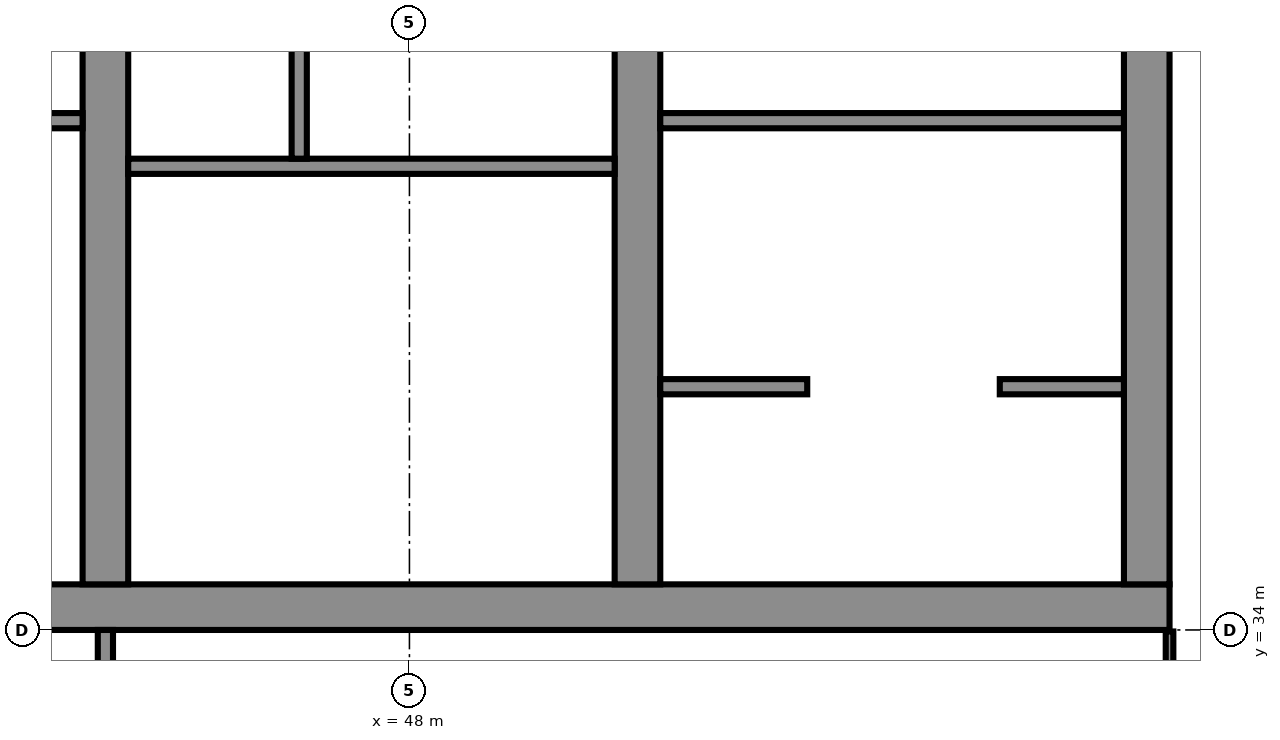
"""IFC4 building model, lengths in metres.
Left out: names, types, materials, properties, quantities, classifications, styles, units other than length and angle.
Written with IfcOpenShell. Run it as: python <this file> out.ifc"""

import sys

from ifc_helpers import new_model, si_unit, direction, frame, frame_2d, origin, place, context, subcontext, project, spatial, polyline, rectangle, outline, extrude, element, fill, save


model = new_model("IFC4")
c1 = context("Model", 3, precision=1e-05, world=origin(), true_north=direction((0.0, 1.0)))
c2 = subcontext(c1, "Body", "Model", "MODEL_VIEW")
j1 = project(units=[si_unit("LENGTHUNIT", "METRE"), si_unit("PLANEANGLEUNIT", "RADIAN")], contexts=[c1])
p1 = place(None, origin())
s1 = spatial("IfcSite", under=j1, at=p1, CompositionType="ELEMENT")
p2 = place(p1, origin())
s2 = spatial("IfcBuilding", under=s1, at=p2, CompositionType="ELEMENT")
p3 = place(p2, frame((0.0, 0.0, 207.1)))
s3 = spatial("IfcBuildingStorey", under=s2, at=p3, CompositionType="ELEMENT", Elevation=207.1)
p4 = place(p3, frame((23.0, 34.3, 0.0), z_axis=(0.0, 0.0, 1.0), x_axis=(1.0, 0.0, 0.0)))
e1 = element("IfcWall", 1, at=p4, inside=s3, PredefinedType="SHEAR", context=c2, shape_type="SweptSolid", body=[
    extrude(rectangle(XDim=35.0, YDim=0.6, at=frame_2d((17.5, 0.0))), origin(), (0.0, 0.0, 1.0), 3.6),
])
p5 = place(p4, frame((0.65, 0.0, 0.0)))
e2 = element("IfcOpeningElement", 2, at=p5, cuts=e1, PredefinedType="OPENING", context=c2, shape_type="SweptSolid", body=[
    extrude(rectangle(XDim=1.2, YDim=2.1, at=frame_2d((0.6, 1.05))), frame((0.0, 0.31, 0.0), z_axis=(0.0, -1.0, 0.0), x_axis=(1.0, 0.0, 0.0)), (0.0, 0.0, 1.0), 0.62),
])
p6 = place(p4, frame((7.717, 0.0, 0.0)))
e3 = element("IfcOpeningElement", 3, at=p6, cuts=e1, PredefinedType="OPENING", context=c2, shape_type="SweptSolid", body=[
    extrude(rectangle(XDim=1.1, YDim=2.1, at=frame_2d((0.55, 1.05))), frame((0.0, 0.31, 0.0), z_axis=(0.0, -1.0, 0.0), x_axis=(1.0, 0.0, 0.0)), (0.0, 0.0, 1.0), 0.62),
])
p7 = place(p4, frame((12.183, 0.0, 0.0)))
e4 = element("IfcOpeningElement", 4, at=p7, cuts=e1, PredefinedType="OPENING", context=c2, shape_type="SweptSolid", body=[
    extrude(rectangle(XDim=1.1, YDim=2.1, at=frame_2d((0.55, 1.05))), frame((0.0, 0.31, 0.0), z_axis=(0.0, -1.0, 0.0), x_axis=(1.0, 0.0, 0.0)), (0.0, 0.0, 1.0), 0.62),
])
p8 = place(p4, frame((9.8, 0.0, 0.0)))
e5 = element("IfcOpeningElement", 5, at=p8, cuts=e1, PredefinedType="OPENING", context=c2, shape_type="SweptSolid", body=[
    extrude(rectangle(XDim=1.4, YDim=2.1, at=frame_2d((0.7, 1.05))), frame((0.0, 0.31, 0.0), z_axis=(0.0, -1.0, 0.0), x_axis=(1.0, 0.0, 0.0)), (0.0, 0.0, 1.0), 0.62),
])
p9 = place(p4, frame((14.717, 0.0, 0.0)))
e6 = element("IfcOpeningElement", 6, at=p9, cuts=e1, PredefinedType="OPENING", context=c2, shape_type="SweptSolid", body=[
    extrude(rectangle(XDim=1.1, YDim=2.1, at=frame_2d((0.55, 1.05))), frame((0.0, 0.31, 0.0), z_axis=(0.0, -1.0, 0.0), x_axis=(1.0, 0.0, 0.0)), (0.0, 0.0, 1.0), 0.62),
])
p10 = place(p4, frame((16.95, 0.0, 0.0)))
e7 = element("IfcOpeningElement", 7, at=p10, cuts=e1, PredefinedType="OPENING", context=c2, shape_type="SweptSolid", body=[
    extrude(rectangle(XDim=1.1, YDim=2.1, at=frame_2d((0.55, 1.05))), frame((0.0, 0.31, 0.0), z_axis=(0.0, -1.0, 0.0), x_axis=(1.0, 0.0, 0.0)), (0.0, 0.0, 1.0), 0.62),
])
p11 = place(p4, frame((19.183, 0.0, 0.0)))
e8 = element("IfcOpeningElement", 8, at=p11, cuts=e1, PredefinedType="OPENING", context=c2, shape_type="SweptSolid", body=[
    extrude(rectangle(XDim=1.1, YDim=2.1, at=frame_2d((0.55, 1.05))), frame((0.0, 0.31, 0.0), z_axis=(0.0, -1.0, 0.0), x_axis=(1.0, 0.0, 0.0)), (0.0, 0.0, 1.0), 0.62),
])
p12 = place(p4, frame((26.15, 0.0, 0.0)))
e9 = element("IfcOpeningElement", 9, at=p12, cuts=e1, PredefinedType="OPENING", context=c2, shape_type="SweptSolid", body=[
    extrude(rectangle(XDim=1.2, YDim=2.1, at=frame_2d((0.6, 1.05))), frame((0.0, 0.31, 0.0), z_axis=(0.0, -1.0, 0.0), x_axis=(1.0, 0.0, 0.0)), (0.0, 0.0, 1.0), 0.62),
])
p13 = place(p4, frame((28.767, 0.0, 0.0)))
e10 = element("IfcOpeningElement", 10, at=p13, cuts=e1, PredefinedType="OPENING", context=c2, shape_type="SweptSolid", body=[
    extrude(rectangle(XDim=1.0, YDim=2.1, at=frame_2d((0.5, 1.05))), frame((0.0, 0.31, 0.0), z_axis=(0.0, -1.0, 0.0), x_axis=(1.0, 0.0, 0.0)), (0.0, 0.0, 1.0), 0.62),
])
p14 = place(p4, frame((33.083, 0.0, 0.0)))
e11 = element("IfcOpeningElement", 11, at=p14, cuts=e1, PredefinedType="OPENING", context=c2, shape_type="SweptSolid", body=[
    extrude(rectangle(XDim=1.0, YDim=2.1, at=frame_2d((0.5, 1.05))), frame((0.0, 0.31, 0.0), z_axis=(0.0, -1.0, 0.0), x_axis=(1.0, 0.0, 0.0)), (0.0, 0.0, 1.0), 0.62),
])
p15 = place(p4, frame((30.8, 0.0, 0.0)))
e12 = element("IfcOpeningElement", 12, at=p15, cuts=e1, PredefinedType="OPENING", context=c2, shape_type="SweptSolid", body=[
    extrude(rectangle(XDim=1.4, YDim=2.1, at=frame_2d((0.7, 1.05))), frame((0.0, 0.31, 0.0), z_axis=(0.0, -1.0, 0.0), x_axis=(1.0, 0.0, 0.0)), (0.0, 0.0, 1.0), 0.62),
])
p16 = place(p3, frame((44.0, 34.6, 0.0), z_axis=(0.0, 0.0, 1.0), x_axis=(0.0, 1.0, 0.0)))
e13 = element("IfcWall", 13, at=p16, inside=s3, PredefinedType="SHEAR", context=c2, shape_type="SweptSolid", body=[
    extrude(rectangle(XDim=14.784, YDim=0.6, at=frame_2d((7.392, 0.0))), origin(), (0.0, 0.0, 1.0), 3.6),
])
p17 = place(p16, frame((11.608, 0.0, 0.0)))
e14 = element("IfcOpeningElement", 14, at=p17, cuts=e13, PredefinedType="OPENING", context=c2, shape_type="SweptSolid", body=[
    extrude(rectangle(XDim=1.0, YDim=2.1, at=frame_2d((0.5, 1.05))), frame((0.0, 0.31, 0.0), z_axis=(0.0, -1.0, 0.0), x_axis=(1.0, 0.0, 0.0)), (0.0, 0.0, 1.0), 0.62),
])
p18 = place(p16, frame((3.8, 0.0, 0.0)))
e15 = element("IfcOpeningElement", 15, at=p18, cuts=e13, PredefinedType="OPENING", context=c2, shape_type="SweptSolid", body=[
    extrude(rectangle(XDim=1.1, YDim=2.1, at=frame_2d((0.55, 1.05))), frame((0.0, 0.31, 0.0), z_axis=(0.0, -1.0, 0.0), x_axis=(1.0, 0.0, 0.0)), (0.0, 0.0, 1.0), 0.62),
])
p19 = place(p3, frame((51.0, 34.6, 0.0), z_axis=(0.0, 0.0, 1.0), x_axis=(0.0, 1.0, 0.0)))
e16 = element("IfcWall", 16, at=p19, inside=s3, PredefinedType="SHEAR", context=c2, shape_type="SweptSolid", body=[
    extrude(rectangle(XDim=14.171, YDim=0.6, at=frame_2d((7.085, 0.0))), origin(), (0.0, 0.0, 1.0), 3.6),
])
p20 = place(p19, frame((3.8, 0.0, 0.0)))
e17 = element("IfcOpeningElement", 17, at=p20, cuts=e16, PredefinedType="OPENING", context=c2, shape_type="SweptSolid", body=[
    extrude(rectangle(XDim=1.1, YDim=2.1, at=frame_2d((0.55, 1.05))), frame((0.0, 0.31, 0.0), z_axis=(0.0, -1.0, 0.0), x_axis=(1.0, 0.0, 0.0)), (0.0, 0.0, 1.0), 0.62),
])
p21 = place(p3, frame((57.7, 34.6, 0.0), z_axis=(0.0, 0.0, 1.0), x_axis=(0.0, 1.0, 0.0)))
e18 = element("IfcWall", 18, at=p21, inside=s3, PredefinedType="SHEAR", context=c2, shape_type="SweptSolid", body=[
    extrude(rectangle(XDim=13.585, YDim=0.6, at=frame_2d((6.792, 0.0))), origin(), (0.0, 0.0, 1.0), 3.6),
])
p22 = place(p3, frame((37.3, 40.7, 0.0), z_axis=(0.0, 0.0, 1.0), x_axis=(1.0, 0.0, 0.0)))
e19 = element("IfcWall", 19, at=p22, inside=s3, PredefinedType="PARTITIONING", context=c2, shape_type="SweptSolid", body=[
    extrude(rectangle(XDim=6.4, YDim=0.2, at=frame_2d((3.2, 0.0))), origin(), (0.0, 0.0, 1.0), 3.2),
])
p23 = place(p22, frame((0.417, 0.0, 0.0)))
e20 = element("IfcOpeningElement", 20, at=p23, cuts=e19, PredefinedType="OPENING", context=c2, shape_type="SweptSolid", body=[
    extrude(rectangle(XDim=1.1, YDim=2.1, at=frame_2d((0.55, 1.05))), frame((0.0, 0.11, 0.0), z_axis=(0.0, -1.0, 0.0), x_axis=(1.0, 0.0, 0.0)), (0.0, 0.0, 1.0), 0.22),
])
p24 = place(p22, frame((2.65, 0.0, 0.0)))
e21 = element("IfcOpeningElement", 21, at=p24, cuts=e19, PredefinedType="OPENING", context=c2, shape_type="SweptSolid", body=[
    extrude(rectangle(XDim=1.1, YDim=2.1, at=frame_2d((0.55, 1.05))), frame((0.0, 0.11, 0.0), z_axis=(0.0, -1.0, 0.0), x_axis=(1.0, 0.0, 0.0)), (0.0, 0.0, 1.0), 0.22),
])
p25 = place(p22, frame((4.883, 0.0, 0.0)))
e22 = element("IfcOpeningElement", 22, at=p25, cuts=e19, PredefinedType="OPENING", context=c2, shape_type="SweptSolid", body=[
    extrude(rectangle(XDim=1.1, YDim=2.1, at=frame_2d((0.55, 1.05))), frame((0.0, 0.11, 0.0), z_axis=(0.0, -1.0, 0.0), x_axis=(1.0, 0.0, 0.0)), (0.0, 0.0, 1.0), 0.22),
])
p26 = place(p3, frame((0.0, 0.0, -0.0)))
e23 = element("IfcWall", 23, at=p26, inside=s3, PredefinedType="PARTITIONING", context=c2, shape_type="SweptSolid", body=[
    extrude(outline(polyline([(41.567, 37.1), (39.433, 37.1), (39.433, 34.6), (39.233, 34.6), (39.233, 37.45), (37.3, 37.45), (37.3, 37.65), (39.233, 37.65), (39.433, 37.65), (39.433, 37.3), (41.567, 37.3), (41.567, 37.35), (41.767, 37.35), (43.7, 37.35), (43.7, 37.15), (41.767, 37.15), (41.767, 34.6), (41.567, 34.6), (41.567, 37.1)])), origin(), (0.0, 0.0, 1.0), 3.2),
])
p27 = place(p3, frame((0.0, 0.0, -0.0)))
e24 = element("IfcWall", 24, at=p27, inside=s3, PredefinedType="PARTITIONING", context=c2, shape_type="SweptSolid", body=[
    extrude(outline(polyline([(39.433, 40.8), (39.233, 40.8), (39.233, 43.8), (37.3, 43.8), (37.3, 44.0), (43.7, 44.0), (43.7, 43.8), (41.767, 43.8), (41.767, 40.8), (41.567, 40.8), (41.567, 43.8), (39.433, 43.8), (39.433, 40.8)])), origin(), (0.0, 0.0, 1.0), 3.2),
])
p28 = place(p3, frame((44.3, 40.1, 0.0), z_axis=(0.0, 0.0, 1.0), x_axis=(1.0, 0.0, 0.0)))
e25 = element("IfcWall", 25, at=p28, inside=s3, PredefinedType="SHEAR", context=c2, shape_type="SweptSolid", body=[
    extrude(rectangle(XDim=6.4, YDim=0.2, at=frame_2d((3.2, 0.0))), origin(), (0.0, 0.0, 1.0), 3.2),
])
p29 = place(p28, frame((3.625, 0.0, 0.0)))
e26 = element("IfcOpeningElement", 26, at=p29, cuts=e25, PredefinedType="OPENING", context=c2, shape_type="SweptSolid", body=[
    extrude(rectangle(XDim=1.2, YDim=2.1, at=frame_2d((0.6, 1.05))), frame((0.0, 0.11, 0.0), z_axis=(0.0, -1.0, 0.0), x_axis=(1.0, 0.0, 0.0)), (0.0, 0.0, 1.0), 0.22),
])
p30 = place(p28, frame((0.625, 0.0, 0.0)))
e27 = element("IfcOpeningElement", 27, at=p30, cuts=e25, PredefinedType="OPENING", context=c2, shape_type="SweptSolid", body=[
    extrude(rectangle(XDim=0.9, YDim=2.1, at=frame_2d((0.45, 1.05))), frame((0.0, 0.11, 0.0), z_axis=(0.0, -1.0, 0.0), x_axis=(1.0, 0.0, 0.0)), (0.0, 0.0, 1.0), 0.22),
])
p31 = place(p3, frame((46.55, 40.2, 0.0), z_axis=(0.0, 0.0, 1.0), x_axis=(0.0, 1.0, 0.0)))
e28 = element("IfcWall", 28, at=p31, inside=s3, PredefinedType="SHEAR", context=c2, shape_type="SweptSolid", body=[
    extrude(rectangle(XDim=7.2, YDim=0.2, at=frame_2d((3.6, 0.0))), origin(), (0.0, 0.0, 1.0), 3.2),
])
p32 = place(p3, frame((51.3, 37.2, 0.0), z_axis=(0.0, 0.0, 1.0), x_axis=(1.0, 0.0, 0.0)))
e29 = element("IfcWall", 29, at=p32, inside=s3, PredefinedType="PARTITIONING", context=c2, shape_type="SweptSolid", body=[
    extrude(rectangle(XDim=1.933, YDim=0.2, at=frame_2d((0.967, 0.0))), origin(), (0.0, 0.0, 1.0), 3.2),
])
p33 = place(p32, frame((0.467, 0.0, 0.0)))
e30 = element("IfcOpeningElement", 30, at=p33, cuts=e29, PredefinedType="OPENING", context=c2, shape_type="SweptSolid", body=[
    extrude(rectangle(XDim=1.0, YDim=2.1, at=frame_2d((0.5, 1.05))), frame((0.0, 0.11, 0.0), z_axis=(0.0, -1.0, 0.0), x_axis=(1.0, 0.0, 0.0)), (0.0, 0.0, 1.0), 0.22),
])
p34 = place(p3, frame((55.767, 37.2, 0.0), z_axis=(0.0, 0.0, 1.0), x_axis=(1.0, 0.0, 0.0)))
e31 = element("IfcWall", 31, at=p34, inside=s3, PredefinedType="PARTITIONING", context=c2, shape_type="SweptSolid", body=[
    extrude(rectangle(XDim=1.633, YDim=0.2, at=frame_2d((0.817, 0.0))), origin(), (0.0, 0.0, 1.0), 3.2),
])
p35 = place(p34, frame((0.317, 0.0, 0.0)))
e32 = element("IfcOpeningElement", 32, at=p35, cuts=e31, PredefinedType="OPENING", context=c2, shape_type="SweptSolid", body=[
    extrude(rectangle(XDim=1.0, YDim=2.1, at=frame_2d((0.5, 1.05))), frame((0.0, 0.11, 0.0), z_axis=(0.0, -1.0, 0.0), x_axis=(1.0, 0.0, 0.0)), (0.0, 0.0, 1.0), 0.22),
])
p36 = place(p3, frame((51.3, 40.7, 0.0), z_axis=(0.0, 0.0, 1.0), x_axis=(1.0, 0.0, 0.0)))
e33 = element("IfcWall", 33, at=p36, inside=s3, PredefinedType="PARTITIONING", context=c2, shape_type="SweptSolid", body=[
    extrude(rectangle(XDim=6.1, YDim=0.2, at=frame_2d((3.05, 0.0))), origin(), (0.0, 0.0, 1.0), 3.2),
])
p37 = place(p36, frame((0.417, 0.0, 0.0)))
e34 = element("IfcOpeningElement", 34, at=p37, cuts=e33, PredefinedType="OPENING", context=c2, shape_type="SweptSolid", body=[
    extrude(rectangle(XDim=1.1, YDim=2.1, at=frame_2d((0.55, 1.05))), frame((0.0, 0.11, 0.0), z_axis=(0.0, -1.0, 0.0), x_axis=(1.0, 0.0, 0.0)), (0.0, 0.0, 1.0), 0.22),
])
p38 = place(p36, frame((3.617, 0.0, 0.0)))
e35 = element("IfcOpeningElement", 35, at=p38, cuts=e33, PredefinedType="OPENING", context=c2, shape_type="SweptSolid", body=[
    extrude(rectangle(XDim=1.0, YDim=2.1, at=frame_2d((0.5, 1.05))), frame((0.0, 0.11, 0.0), z_axis=(0.0, -1.0, 0.0), x_axis=(1.0, 0.0, 0.0)), (0.0, 0.0, 1.0), 0.22),
])
p39 = place(p3, frame((0.0, 0.0, -0.0)))
e36 = element("IfcWall", 36, at=p39, inside=s3, PredefinedType="PARTITIONING", context=c2, shape_type="SweptSolid", body=[
    extrude(outline(polyline([(53.233, 34.6), (53.233, 37.3), (53.433, 37.3), (53.433, 34.6), (53.233, 34.6)])), origin(), (0.0, 0.0, 1.0), 3.2),
])
p40 = place(p3, frame((0.0, 0.0, -0.0)))
e37 = element("IfcWall", 37, at=p40, inside=s3, PredefinedType="PARTITIONING", context=c2, shape_type="SweptSolid", body=[
    extrude(outline(polyline([(55.567, 34.6), (55.567, 37.3), (55.767, 37.3), (55.767, 34.6), (55.567, 34.6)])), origin(), (0.0, 0.0, 1.0), 3.2),
])
p41 = place(p3, frame((0.0, 0.0, -0.0)))
e38 = element("IfcWall", 38, at=p41, inside=s3, PredefinedType="PARTITIONING", context=c2, shape_type="SweptSolid", body=[
    extrude(outline(polyline([(53.433, 40.8), (53.433, 43.8), (53.233, 43.8), (53.233, 40.8), (53.433, 40.8)])), origin(), (0.0, 0.0, 1.0), 3.2),
])
p42 = place(p3, frame((44.0, 30.5, 0.0), z_axis=(0.0, 0.0, 1.0), x_axis=(0.0, 1.0, 0.0)))
e39 = element("IfcWall", 39, at=p42, inside=s3, PredefinedType="PARTITIONING", context=c2, shape_type="SweptSolid", body=[
    extrude(rectangle(XDim=3.5, YDim=0.2, at=frame_2d((1.75, 0.0))), origin(), (0.0, 0.0, 1.0), 3.2),
])
p43 = place(p42, frame((1.2, 0.0, 0.0)))
e40 = element("IfcOpeningElement", 40, at=p43, cuts=e39, PredefinedType="OPENING", context=c2, shape_type="SweptSolid", body=[
    extrude(rectangle(XDim=1.1, YDim=2.1, at=frame_2d((0.55, 1.05))), frame((0.0, 0.11, 0.0), z_axis=(0.0, -1.0, 0.0), x_axis=(1.0, 0.0, 0.0)), (0.0, 0.0, 1.0), 0.22),
])
p44 = place(p3, frame((58.0, 30.5, 0.0), z_axis=(0.0, 0.0, 1.0), x_axis=(0.0, 1.0, 0.0)))
e41 = element("IfcWall", 41, at=p44, inside=s3, PredefinedType="PARTITIONING", context=c2, shape_type="SweptSolid", body=[
    extrude(rectangle(XDim=3.48, YDim=0.1, at=frame_2d((1.74, 0.0))), origin(), (0.0, 0.0, 1.0), 3.2),
])
p45 = place(p29, origin())
e42 = element("IfcDoor", 42, at=p45, inside=s3, OperationType="SINGLE_SWING_RIGHT", PredefinedType="DOOR", context=c2, shape_type="SweptSolid", body=[
    extrude(rectangle(XDim=1.2, YDim=2.1, at=frame_2d((0.6, 1.05))), frame((0.0, 0.025, 0.0), z_axis=(0.0, -1.0, 0.0), x_axis=(1.0, 0.0, 0.0)), (0.0, 0.0, 1.0), 0.05),
])
fill(e26, e42)
p46 = place(p30, origin())
e43 = element("IfcDoor", 43, at=p46, inside=s3, OperationType="SINGLE_SWING_LEFT", PredefinedType="DOOR", context=c2, shape_type="SweptSolid", body=[
    extrude(rectangle(XDim=0.9, YDim=2.1, at=frame_2d((0.45, 1.05))), frame((0.0, 0.025, 0.0), z_axis=(0.0, -1.0, 0.0), x_axis=(1.0, 0.0, 0.0)), (0.0, 0.0, 1.0), 0.05),
])
fill(e27, e43)
p47 = place(p12, origin())
e44 = element("IfcDoor", 44, at=p47, inside=s3, OperationType="SINGLE_SWING_LEFT", PredefinedType="DOOR", context=c2, shape_type="SweptSolid", body=[
    extrude(rectangle(XDim=1.2, YDim=2.1, at=frame_2d((0.6, 1.05))), frame((0.0, 0.025, 0.0), z_axis=(0.0, -1.0, 0.0), x_axis=(1.0, 0.0, 0.0)), (0.0, 0.0, 1.0), 0.05),
])
fill(e9, e44)
p48 = place(p13, origin())
e45 = element("IfcDoor", 45, at=p48, inside=s3, OperationType="SINGLE_SWING_LEFT", PredefinedType="DOOR", context=c2, shape_type="SweptSolid", body=[
    extrude(rectangle(XDim=1.0, YDim=2.1, at=frame_2d((0.5, 1.05))), frame((0.0, 0.025, 0.0), z_axis=(0.0, -1.0, 0.0), x_axis=(1.0, 0.0, 0.0)), (0.0, 0.0, 1.0), 0.05),
])
fill(e10, e45)
p49 = place(p33, origin())
e46 = element("IfcDoor", 46, at=p49, inside=s3, OperationType="SINGLE_SWING_RIGHT", PredefinedType="DOOR", context=c2, shape_type="SweptSolid", body=[
    extrude(rectangle(XDim=1.0, YDim=2.1, at=frame_2d((0.5, 1.05))), frame((0.0, 0.025, 0.0), z_axis=(0.0, -1.0, 0.0), x_axis=(1.0, 0.0, 0.0)), (0.0, 0.0, 1.0), 0.05),
])
fill(e30, e46)
p50 = place(p14, origin())
e47 = element("IfcDoor", 47, at=p50, inside=s3, OperationType="SINGLE_SWING_LEFT", PredefinedType="DOOR", context=c2, shape_type="SweptSolid", body=[
    extrude(rectangle(XDim=1.0, YDim=2.1, at=frame_2d((0.5, 1.05))), frame((0.0, 0.025, 0.0), z_axis=(0.0, -1.0, 0.0), x_axis=(1.0, 0.0, 0.0)), (0.0, 0.0, 1.0), 0.05),
])
fill(e11, e47)
p51 = place(p35, origin())
e48 = element("IfcDoor", 48, at=p51, inside=s3, OperationType="SINGLE_SWING_RIGHT", PredefinedType="DOOR", context=c2, shape_type="SweptSolid", body=[
    extrude(rectangle(XDim=1.0, YDim=2.1, at=frame_2d((0.5, 1.05))), frame((0.0, 0.025, 0.0), z_axis=(0.0, -1.0, 0.0), x_axis=(1.0, 0.0, 0.0)), (0.0, 0.0, 1.0), 0.05),
])
fill(e32, e48)
p52 = place(p15, origin())
e49 = element("IfcDoor", 49, at=p52, inside=s3, OperationType="DOUBLE_DOOR_SINGLE_SWING", PredefinedType="DOOR", context=c2, shape_type="SweptSolid", body=[
    extrude(rectangle(XDim=1.4, YDim=2.1, at=frame_2d((0.7, 1.05))), frame((0.0, 0.025, 0.0), z_axis=(0.0, -1.0, 0.0), x_axis=(1.0, 0.0, 0.0)), (0.0, 0.0, 1.0), 0.05),
])
fill(e12, e49)
p53 = place(p37, origin())
e50 = element("IfcDoor", 50, at=p53, inside=s3, OperationType="DOUBLE_DOOR_SLIDING", PredefinedType="DOOR", context=c2, shape_type="SweptSolid", body=[
    extrude(rectangle(XDim=1.1, YDim=2.1, at=frame_2d((0.55, 1.05))), frame((0.0, 0.025, 0.0), z_axis=(0.0, -1.0, 0.0), x_axis=(1.0, 0.0, 0.0)), (0.0, 0.0, 1.0), 0.05),
])
fill(e34, e50)
p54 = place(p38, origin())
e51 = element("IfcDoor", 51, at=p54, inside=s3, OperationType="SINGLE_SWING_RIGHT", PredefinedType="DOOR", context=c2, shape_type="SweptSolid", body=[
    extrude(rectangle(XDim=1.0, YDim=2.1, at=frame_2d((0.5, 1.05))), frame((0.0, 0.025, 0.0), z_axis=(0.0, -1.0, 0.0), x_axis=(1.0, 0.0, 0.0)), (0.0, 0.0, 1.0), 0.05),
])
fill(e35, e51)
p55 = place(p18, origin())
e52 = element("IfcDoor", 52, at=p55, inside=s3, OperationType="SINGLE_SWING_LEFT", PredefinedType="DOOR", context=c2, shape_type="SweptSolid", body=[
    extrude(rectangle(XDim=1.1, YDim=2.1, at=frame_2d((0.55, 1.05))), frame((0.0, 0.025, 0.0), z_axis=(0.0, -1.0, 0.0), x_axis=(1.0, 0.0, 0.0)), (0.0, 0.0, 1.0), 0.05),
])
fill(e15, e52)
p56 = place(p20, origin())
e53 = element("IfcDoor", 53, at=p56, inside=s3, OperationType="SINGLE_SWING_RIGHT", PredefinedType="DOOR", context=c2, shape_type="SweptSolid", body=[
    extrude(rectangle(XDim=1.1, YDim=2.1, at=frame_2d((0.55, 1.05))), frame((0.0, 0.025, 0.0), z_axis=(0.0, -1.0, 0.0), x_axis=(1.0, 0.0, 0.0)), (0.0, 0.0, 1.0), 0.05),
])
fill(e17, e53)
save(model, sys.argv[1])
